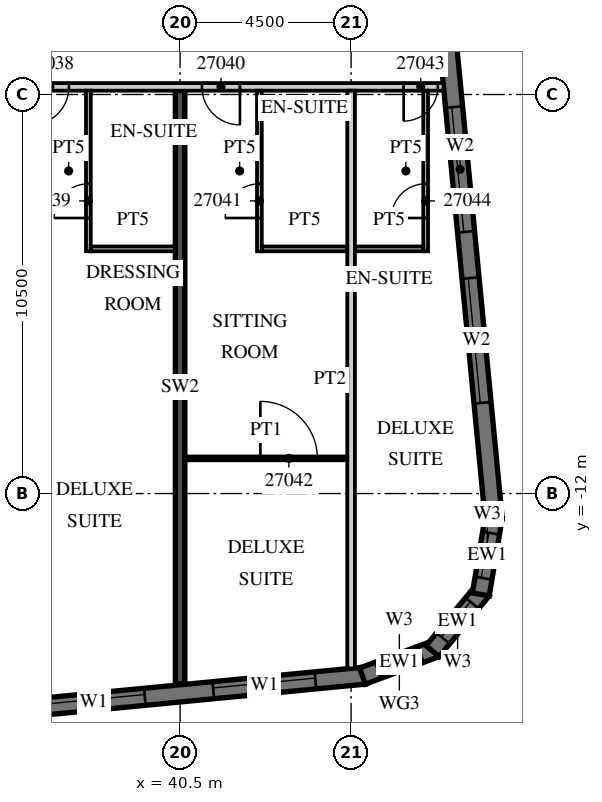
"""IFC4 building model, lengths in metres.
Left out: names, types, materials, properties, quantities, classifications, styles, units other than length and angle.
Written with IfcOpenShell. Run it as: python <this file> out.ifc"""

import sys

from ifc_helpers import new_model, si_unit, direction, frame, frame_2d, origin, place, context, subcontext, project, spatial, polyline, rectangle, outline, extrude, element, fill, save


model = new_model("IFC4")
c1 = context("Model", 3, precision=1e-05, world=origin(), true_north=direction((0.0, 1.0)))
c2 = subcontext(c1, "Body", "Model", "MODEL_VIEW")
j1 = project(units=[si_unit("LENGTHUNIT", "METRE"), si_unit("PLANEANGLEUNIT", "RADIAN")], contexts=[c1])
p1 = place(None, origin())
s1 = spatial("IfcSite", under=j1, at=p1, CompositionType="ELEMENT")
p2 = place(p1, origin())
s2 = spatial("IfcBuilding", under=s1, at=p2, CompositionType="ELEMENT")
p3 = place(p2, frame((0.0, 0.0, 124.0)))
s3 = spatial("IfcBuildingStorey", under=s2, at=p3, CompositionType="ELEMENT", Elevation=124.0)
p4 = place(p3, frame((40.5, -17.011, 0.0), z_axis=(0.0, 0.0, 1.0), x_axis=(0.0, 1.0, 0.0)))
e1 = element("IfcWall", 1, at=p4, inside=s3, PredefinedType="SHEAR", context=c2, shape_type="SweptSolid", body=[
    extrude(rectangle(XDim=15.611, YDim=0.25, at=frame_2d((7.805, 0.0))), origin(), (0.0, 0.0, 1.0), 3.3),
])
p5 = place(p3, frame((-13.521, -22.46, 0.0), z_axis=(0.0, 0.0, 1.0), x_axis=(0.995396096335, 0.095846812164, 0.0)))
e2 = element("IfcWall", 2, at=p5, inside=s3, PredefinedType="SOLIDWALL", context=c2, shape_type="SweptSolid", body=[
    extrude(rectangle(XDim=59.151, YDim=0.45, at=frame_2d((29.575, 0.0))), origin(), (0.0, 0.0, 1.0), 3.02),
])
p6 = place(p5, frame((0.91, 0.0, 0.45)))
e3 = element("IfcOpeningElement", 3, at=p6, cuts=e2, PredefinedType="OPENING", context=c2, shape_type="SweptSolid", body=[
    extrude(rectangle(XDim=2.7, YDim=2.25, at=frame_2d((1.35, 1.125))), frame((0.0, 0.235, 0.0), z_axis=(0.0, -1.0, 0.0), x_axis=(1.0, 0.0, 0.0)), (0.0, 0.0, 1.0), 0.47),
])
p7 = place(p5, frame((5.431, 0.0, 0.45)))
e4 = element("IfcOpeningElement", 4, at=p7, cuts=e2, PredefinedType="OPENING", context=c2, shape_type="SweptSolid", body=[
    extrude(rectangle(XDim=2.7, YDim=2.25, at=frame_2d((1.35, 1.125))), frame((0.0, 0.235, 0.0), z_axis=(0.0, -1.0, 0.0), x_axis=(1.0, 0.0, 0.0)), (0.0, 0.0, 1.0), 0.47),
])
p8 = place(p5, frame((9.952, 0.0, 0.45)))
e5 = element("IfcOpeningElement", 5, at=p8, cuts=e2, PredefinedType="OPENING", context=c2, shape_type="SweptSolid", body=[
    extrude(rectangle(XDim=2.7, YDim=2.25, at=frame_2d((1.35, 1.125))), frame((0.0, 0.235, 0.0), z_axis=(0.0, -1.0, 0.0), x_axis=(1.0, 0.0, 0.0)), (0.0, 0.0, 1.0), 0.47),
])
p9 = place(p5, frame((14.473, 0.0, 0.45)))
e6 = element("IfcOpeningElement", 6, at=p9, cuts=e2, PredefinedType="OPENING", context=c2, shape_type="SweptSolid", body=[
    extrude(rectangle(XDim=2.7, YDim=2.25, at=frame_2d((1.35, 1.125))), frame((0.0, 0.235, 0.0), z_axis=(0.0, -1.0, 0.0), x_axis=(1.0, 0.0, 0.0)), (0.0, 0.0, 1.0), 0.47),
])
p10 = place(p5, frame((18.994, 0.0, 0.45)))
e7 = element("IfcOpeningElement", 7, at=p10, cuts=e2, PredefinedType="OPENING", context=c2, shape_type="SweptSolid", body=[
    extrude(rectangle(XDim=2.7, YDim=2.25, at=frame_2d((1.35, 1.125))), frame((0.0, 0.235, 0.0), z_axis=(0.0, -1.0, 0.0), x_axis=(1.0, 0.0, 0.0)), (0.0, 0.0, 1.0), 0.47),
])
p11 = place(p5, frame((23.514, 0.0, 0.45)))
e8 = element("IfcOpeningElement", 8, at=p11, cuts=e2, PredefinedType="OPENING", context=c2, shape_type="SweptSolid", body=[
    extrude(rectangle(XDim=2.7, YDim=2.25, at=frame_2d((1.35, 1.125))), frame((0.0, 0.235, 0.0), z_axis=(0.0, -1.0, 0.0), x_axis=(1.0, 0.0, 0.0)), (0.0, 0.0, 1.0), 0.47),
])
p12 = place(p5, frame((28.035, 0.0, 0.45)))
e9 = element("IfcOpeningElement", 9, at=p12, cuts=e2, PredefinedType="OPENING", context=c2, shape_type="SweptSolid", body=[
    extrude(rectangle(XDim=2.7, YDim=2.25, at=frame_2d((1.35, 1.125))), frame((0.0, 0.235, 0.0), z_axis=(0.0, -1.0, 0.0), x_axis=(1.0, 0.0, 0.0)), (0.0, 0.0, 1.0), 0.47),
])
p13 = place(p5, frame((32.556, 0.0, 0.45)))
e10 = element("IfcOpeningElement", 10, at=p13, cuts=e2, PredefinedType="OPENING", context=c2, shape_type="SweptSolid", body=[
    extrude(rectangle(XDim=2.7, YDim=2.25, at=frame_2d((1.35, 1.125))), frame((0.0, 0.235, 0.0), z_axis=(0.0, -1.0, 0.0), x_axis=(1.0, 0.0, 0.0)), (0.0, 0.0, 1.0), 0.47),
])
p14 = place(p5, frame((37.077, 0.0, 0.45)))
e11 = element("IfcOpeningElement", 11, at=p14, cuts=e2, PredefinedType="OPENING", context=c2, shape_type="SweptSolid", body=[
    extrude(rectangle(XDim=2.7, YDim=2.25, at=frame_2d((1.35, 1.125))), frame((0.0, 0.235, 0.0), z_axis=(0.0, -1.0, 0.0), x_axis=(1.0, 0.0, 0.0)), (0.0, 0.0, 1.0), 0.47),
])
p15 = place(p5, frame((41.598, 0.0, 0.45)))
e12 = element("IfcOpeningElement", 12, at=p15, cuts=e2, PredefinedType="OPENING", context=c2, shape_type="SweptSolid", body=[
    extrude(rectangle(XDim=2.7, YDim=2.25, at=frame_2d((1.35, 1.125))), frame((0.0, 0.235, 0.0), z_axis=(0.0, -1.0, 0.0), x_axis=(1.0, 0.0, 0.0)), (0.0, 0.0, 1.0), 0.47),
])
p16 = place(p5, frame((46.118, 0.0, 0.45)))
e13 = element("IfcOpeningElement", 13, at=p16, cuts=e2, PredefinedType="OPENING", context=c2, shape_type="SweptSolid", body=[
    extrude(rectangle(XDim=2.7, YDim=2.25, at=frame_2d((1.35, 1.125))), frame((0.0, 0.235, 0.0), z_axis=(0.0, -1.0, 0.0), x_axis=(1.0, 0.0, 0.0)), (0.0, 0.0, 1.0), 0.47),
])
p17 = place(p5, frame((50.639, 0.0, 0.45)))
e14 = element("IfcOpeningElement", 14, at=p17, cuts=e2, PredefinedType="OPENING", context=c2, shape_type="SweptSolid", body=[
    extrude(rectangle(XDim=2.7, YDim=2.25, at=frame_2d((1.35, 1.125))), frame((0.0, 0.235, 0.0), z_axis=(0.0, -1.0, 0.0), x_axis=(1.0, 0.0, 0.0)), (0.0, 0.0, 1.0), 0.47),
])
p18 = place(p5, frame((55.15, 0.0, 0.45)))
e15 = element("IfcOpeningElement", 15, at=p18, cuts=e2, PredefinedType="OPENING", context=c2, shape_type="SweptSolid", body=[
    extrude(rectangle(XDim=2.7, YDim=2.25, at=frame_2d((1.35, 1.125))), frame((0.0, 0.235, 0.0), z_axis=(0.0, -1.0, 0.0), x_axis=(1.0, 0.0, 0.0)), (0.0, 0.0, 1.0), 0.47),
])
p19 = place(p3, frame((45.3, -16.804, 0.0), z_axis=(0.0, 0.0, 1.0), x_axis=(0.936677599948, 0.350192909346, 0.0)))
e16 = element("IfcWall", 16, at=p19, inside=s3, PredefinedType="SOLIDWALL", context=c2, shape_type="SweptSolid", body=[
    extrude(outline(polyline([(0.0, -0.225), (2.071, -0.225), (1.95, 0.225), (0.121, 0.225), (0.0, -0.225)])), origin(), (0.0, 0.0, 1.0), 3.02),
])
p20 = place(p19, frame((0.435, 0.0, 0.45)))
e17 = element("IfcOpeningElement", 17, at=p20, cuts=e16, PredefinedType="OPENING", context=c2, shape_type="SweptSolid", body=[
    extrude(rectangle(XDim=1.2, YDim=2.25, at=frame_2d((0.6, 1.125))), frame((0.0, 0.235, 0.0), z_axis=(0.0, -1.0, 0.0), x_axis=(1.0, 0.0, 0.0)), (0.0, 0.0, 1.0), 0.47),
])
p21 = place(p3, frame((47.145, -16.147, 0.0), z_axis=(0.0, 0.0, 1.0), x_axis=(0.635988241739, 0.771698747161, 0.0)))
e18 = element("IfcWall", 18, at=p21, inside=s3, PredefinedType="SOLIDWALL", context=c2, shape_type="SweptSolid", body=[
    extrude(outline(polyline([(0.0, -0.225), (2.071, -0.225), (1.95, 0.225), (0.121, 0.225), (0.0, -0.225)])), origin(), (0.0, 0.0, 1.0), 3.02),
])
p22 = place(p21, frame((0.435, 0.0, 0.45)))
e19 = element("IfcOpeningElement", 19, at=p22, cuts=e18, PredefinedType="OPENING", context=c2, shape_type="SweptSolid", body=[
    extrude(rectangle(XDim=1.2, YDim=2.25, at=frame_2d((0.6, 1.125))), frame((0.0, 0.235, 0.0), z_axis=(0.0, -1.0, 0.0), x_axis=(1.0, 0.0, 0.0)), (0.0, 0.0, 1.0), 0.47),
])
p23 = place(p3, frame((48.413, -14.655, 0.0), z_axis=(0.0, 0.0, 1.0), x_axis=(0.165068144653, 0.986282164302, 0.0)))
e20 = element("IfcWall", 20, at=p23, inside=s3, PredefinedType="SOLIDWALL", context=c2, shape_type="SweptSolid", body=[
    extrude(outline(polyline([(0.0, -0.225), (2.071, -0.225), (1.95, 0.225), (0.121, 0.225), (0.0, -0.225)])), origin(), (0.0, 0.0, 1.0), 3.02),
])
p24 = place(p23, frame((0.435, 0.0, 0.45)))
e21 = element("IfcOpeningElement", 21, at=p24, cuts=e20, PredefinedType="OPENING", context=c2, shape_type="SweptSolid", body=[
    extrude(rectangle(XDim=1.2, YDim=2.25, at=frame_2d((0.6, 1.125))), frame((0.0, 0.235, 0.0), z_axis=(0.0, -1.0, 0.0), x_axis=(1.0, 0.0, 0.0)), (0.0, 0.0, 1.0), 0.47),
])
p25 = place(p3, frame((48.753, -12.672, 0.0), z_axis=(0.0, 0.0, 1.0), x_axis=(-0.095842661909, 0.995396495954, 0.0)))
e22 = element("IfcWall", 22, at=p25, inside=s3, PredefinedType="SOLIDWALL", context=c2, shape_type="SweptSolid", body=[
    extrude(rectangle(XDim=35.0, YDim=0.45, at=frame_2d((17.5, 0.0))), origin(), (0.0, 0.0, 1.0), 3.02),
])
p26 = place(p25, frame((3.072, 0.0, 0.45)))
e23 = element("IfcOpeningElement", 23, at=p26, cuts=e22, PredefinedType="OPENING", context=c2, shape_type="SweptSolid", body=[
    extrude(rectangle(XDim=3.3, YDim=2.25, at=frame_2d((1.65, 1.125))), frame((0.0, 0.235, 0.0), z_axis=(0.0, -1.0, 0.0), x_axis=(1.0, 0.0, 0.0)), (0.0, 0.0, 1.0), 0.47),
])
p27 = place(p25, frame((7.593, 0.0, 0.45)))
e24 = element("IfcOpeningElement", 24, at=p27, cuts=e22, PredefinedType="OPENING", context=c2, shape_type="SweptSolid", body=[
    extrude(rectangle(XDim=3.3, YDim=2.25, at=frame_2d((1.65, 1.125))), frame((0.0, 0.235, 0.0), z_axis=(0.0, -1.0, 0.0), x_axis=(1.0, 0.0, 0.0)), (0.0, 0.0, 1.0), 0.47),
])
p28 = place(p3, frame((-13.5, -1.3, 0.0), z_axis=(0.0, 0.0, 1.0), x_axis=(1.0, 0.0, 0.0)))
e25 = element("IfcWall", 25, at=p28, inside=s3, PredefinedType="PARTITIONING", context=c2, shape_type="SweptSolid", body=[
    extrude(rectangle(XDim=60.932, YDim=0.2, at=frame_2d((30.466, 0.0))), origin(), (0.0, 0.0, 1.0), 3.02),
])
p29 = place(p28, frame((2.925, 0.0, 0.0)))
e26 = element("IfcOpeningElement", 26, at=p29, cuts=e25, PredefinedType="OPENING", context=c2, shape_type="SweptSolid", body=[
    extrude(rectangle(XDim=1.0, YDim=2.1, at=frame_2d((0.5, 1.05))), frame((0.0, 0.11, 0.0), z_axis=(0.0, -1.0, 0.0), x_axis=(1.0, 0.0, 0.0)), (0.0, 0.0, 1.0), 0.22),
])
p30 = place(p28, frame((9.863, 0.0, 0.0)))
e27 = element("IfcOpeningElement", 27, at=p30, cuts=e25, PredefinedType="OPENING", context=c2, shape_type="SweptSolid", body=[
    extrude(rectangle(XDim=1.2, YDim=2.1, at=frame_2d((0.6, 1.05))), frame((0.0, 0.11, 0.0), z_axis=(0.0, -1.0, 0.0), x_axis=(1.0, 0.0, 0.0)), (0.0, 0.0, 1.0), 0.22),
])
p31 = place(p28, frame((15.938, 0.0, 0.0)))
e28 = element("IfcOpeningElement", 28, at=p31, cuts=e25, PredefinedType="OPENING", context=c2, shape_type="SweptSolid", body=[
    extrude(rectangle(XDim=1.2, YDim=2.1, at=frame_2d((0.6, 1.05))), frame((0.0, 0.11, 0.0), z_axis=(0.0, -1.0, 0.0), x_axis=(1.0, 0.0, 0.0)), (0.0, 0.0, 1.0), 0.22),
])
p32 = place(p28, frame((27.862, 0.0, 0.0)))
e29 = element("IfcOpeningElement", 29, at=p32, cuts=e25, PredefinedType="OPENING", context=c2, shape_type="SweptSolid", body=[
    extrude(rectangle(XDim=1.2, YDim=2.1, at=frame_2d((0.6, 1.05))), frame((0.0, 0.11, 0.0), z_axis=(0.0, -1.0, 0.0), x_axis=(1.0, 0.0, 0.0)), (0.0, 0.0, 1.0), 0.22),
])
p33 = place(p28, frame((34.45, 0.0, 0.0)))
e30 = element("IfcOpeningElement", 30, at=p33, cuts=e25, PredefinedType="OPENING", context=c2, shape_type="SweptSolid", body=[
    extrude(rectangle(XDim=1.0, YDim=2.1, at=frame_2d((0.5, 1.05))), frame((0.0, 0.11, 0.0), z_axis=(0.0, -1.0, 0.0), x_axis=(1.0, 0.0, 0.0)), (0.0, 0.0, 1.0), 0.22),
])
p34 = place(p28, frame((36.55, 0.0, 0.0)))
e31 = element("IfcOpeningElement", 31, at=p34, cuts=e25, PredefinedType="OPENING", context=c2, shape_type="SweptSolid", body=[
    extrude(rectangle(XDim=1.0, YDim=2.1, at=frame_2d((0.5, 1.05))), frame((0.0, 0.11, 0.0), z_axis=(0.0, -1.0, 0.0), x_axis=(1.0, 0.0, 0.0)), (0.0, 0.0, 1.0), 0.22),
])
p35 = place(p28, frame((41.075, 0.0, 0.0)))
e32 = element("IfcOpeningElement", 32, at=p35, cuts=e25, PredefinedType="OPENING", context=c2, shape_type="SweptSolid", body=[
    extrude(rectangle(XDim=1.0, YDim=2.1, at=frame_2d((0.5, 1.05))), frame((0.0, 0.11, 0.0), z_axis=(0.0, -1.0, 0.0), x_axis=(1.0, 0.0, 0.0)), (0.0, 0.0, 1.0), 0.22),
])
p36 = place(p28, frame((45.55, 0.0, 0.0)))
e33 = element("IfcOpeningElement", 33, at=p36, cuts=e25, PredefinedType="OPENING", context=c2, shape_type="SweptSolid", body=[
    extrude(rectangle(XDim=1.0, YDim=2.1, at=frame_2d((0.5, 1.05))), frame((0.0, 0.11, 0.0), z_axis=(0.0, -1.0, 0.0), x_axis=(1.0, 0.0, 0.0)), (0.0, 0.0, 1.0), 0.22),
])
p37 = place(p28, frame((50.075, 0.0, 0.0)))
e34 = element("IfcOpeningElement", 34, at=p37, cuts=e25, PredefinedType="OPENING", context=c2, shape_type="SweptSolid", body=[
    extrude(rectangle(XDim=1.0, YDim=2.1, at=frame_2d((0.5, 1.05))), frame((0.0, 0.11, 0.0), z_axis=(0.0, -1.0, 0.0), x_axis=(1.0, 0.0, 0.0)), (0.0, 0.0, 1.0), 0.22),
])
p38 = place(p28, frame((54.575, 0.0, 0.0)))
e35 = element("IfcOpeningElement", 35, at=p38, cuts=e25, PredefinedType="OPENING", context=c2, shape_type="SweptSolid", body=[
    extrude(rectangle(XDim=1.0, YDim=2.1, at=frame_2d((0.5, 1.05))), frame((0.0, 0.11, 0.0), z_axis=(0.0, -1.0, 0.0), x_axis=(1.0, 0.0, 0.0)), (0.0, 0.0, 1.0), 0.22),
])
p39 = place(p28, frame((59.882, 0.0, 0.0)))
e36 = element("IfcOpeningElement", 36, at=p39, cuts=e25, PredefinedType="OPENING", context=c2, shape_type="SweptSolid", body=[
    extrude(rectangle(XDim=0.9, YDim=2.1, at=frame_2d((0.45, 1.05))), frame((0.0, 0.11, 0.0), z_axis=(0.0, -1.0, 0.0), x_axis=(1.0, 0.0, 0.0)), (0.0, 0.0, 1.0), 0.22),
])
p40 = place(p3, frame((38.087, -5.625, 0.0), z_axis=(0.0, 0.0, 1.0), x_axis=(0.0, 1.0, 0.0)))
e37 = element("IfcWall", 37, at=p40, inside=s3, PredefinedType="PARTITIONING", context=c2, shape_type="SweptSolid", body=[
    extrude(rectangle(XDim=4.225, YDim=0.125, at=frame_2d((2.113, 0.0))), origin(), (0.0, 0.0, 1.0), 3.02),
])
p41 = place(p40, frame((0.875, 0.0, 0.0)))
e38 = element("IfcOpeningElement", 38, at=p41, cuts=e37, PredefinedType="OPENING", context=c2, shape_type="SweptSolid", body=[
    extrude(rectangle(XDim=0.9, YDim=2.1, at=frame_2d((0.45, 1.05))), frame((0.0, 0.073, 0.0), z_axis=(0.0, -1.0, 0.0), x_axis=(1.0, 0.0, 0.0)), (0.0, 0.0, 1.0), 0.145),
])
p42 = place(p3, frame((38.15, -5.562, 0.0), z_axis=(0.0, 0.0, 1.0), x_axis=(1.0, 0.0, 0.0)))
e39 = element("IfcWall", 39, at=p42, inside=s3, PredefinedType="PARTITIONING", context=c2, shape_type="SweptSolid", body=[
    extrude(rectangle(XDim=2.225, YDim=0.125, at=frame_2d((1.113, 0.0))), origin(), (0.0, 0.0, 1.0), 3.02),
])
p43 = place(p3, frame((45.0, -16.599, 0.0), z_axis=(0.0, 0.0, 1.0), x_axis=(0.0, 1.0, 0.0)))
e40 = element("IfcWall", 40, at=p43, inside=s3, PredefinedType="PARTITIONING", context=c2, shape_type="SweptSolid", body=[
    extrude(rectangle(XDim=15.199, YDim=0.2, at=frame_2d((7.6, 0.0))), origin(), (0.0, 0.0, 1.0), 3.02),
])
p44 = place(p3, frame((42.587, -5.625, 0.0), z_axis=(0.0, 0.0, 1.0), x_axis=(0.0, 1.0, 0.0)))
e41 = element("IfcWall", 41, at=p44, inside=s3, PredefinedType="PARTITIONING", context=c2, shape_type="SweptSolid", body=[
    extrude(rectangle(XDim=4.225, YDim=0.125, at=frame_2d((2.113, 0.0))), origin(), (0.0, 0.0, 1.0), 3.02),
])
p45 = place(p44, frame((0.875, 0.0, 0.0)))
e42 = element("IfcOpeningElement", 42, at=p45, cuts=e41, PredefinedType="OPENING", context=c2, shape_type="SweptSolid", body=[
    extrude(rectangle(XDim=0.9, YDim=2.1, at=frame_2d((0.45, 1.05))), frame((0.0, 0.073, 0.0), z_axis=(0.0, -1.0, 0.0), x_axis=(1.0, 0.0, 0.0)), (0.0, 0.0, 1.0), 0.145),
])
p46 = place(p3, frame((42.65, -5.562, 0.0), z_axis=(0.0, 0.0, 1.0), x_axis=(1.0, 0.0, 0.0)))
e43 = element("IfcWall", 43, at=p46, inside=s3, PredefinedType="PARTITIONING", context=c2, shape_type="SweptSolid", body=[
    extrude(rectangle(XDim=2.25, YDim=0.125, at=frame_2d((1.125, 0.0))), origin(), (0.0, 0.0, 1.0), 3.02),
])
p47 = place(p3, frame((40.625, -11.075, 0.0), z_axis=(0.0, 0.0, 1.0), x_axis=(1.0, 0.0, 0.0)))
e44 = element("IfcWall", 44, at=p47, inside=s3, PredefinedType="PARTITIONING", context=c2, shape_type="SweptSolid", body=[
    extrude(rectangle(XDim=4.275, YDim=0.1, at=frame_2d((2.137, 0.0))), origin(), (0.0, 0.0, 1.0), 3.02),
])
p48 = place(p47, frame((1.988, 0.0, 0.0)))
e45 = element("IfcOpeningElement", 45, at=p48, cuts=e44, PredefinedType="OPENING", context=c2, shape_type="SweptSolid", body=[
    extrude(rectangle(XDim=1.5, YDim=2.1, at=frame_2d((0.75, 1.05))), frame((0.0, 0.06, 0.0), z_axis=(0.0, -1.0, 0.0), x_axis=(1.0, 0.0, 0.0)), (0.0, 0.0, 1.0), 0.12),
])
p49 = place(p3, frame((46.962, -5.625, 0.0), z_axis=(0.0, 0.0, 1.0), x_axis=(0.0, 1.0, 0.0)))
e46 = element("IfcWall", 46, at=p49, inside=s3, PredefinedType="PARTITIONING", context=c2, shape_type="SweptSolid", body=[
    extrude(rectangle(XDim=4.225, YDim=0.125, at=frame_2d((2.113, 0.0))), origin(), (0.0, 0.0, 1.0), 3.02),
])
p50 = place(p49, frame((0.875, 0.0, 0.0)))
e47 = element("IfcOpeningElement", 47, at=p50, cuts=e46, PredefinedType="OPENING", context=c2, shape_type="SweptSolid", body=[
    extrude(rectangle(XDim=0.9, YDim=2.1, at=frame_2d((0.45, 1.05))), frame((0.0, 0.073, 0.0), z_axis=(0.0, -1.0, 0.0), x_axis=(1.0, 0.0, 0.0)), (0.0, 0.0, 1.0), 0.145),
])
p51 = place(p3, frame((45.1, -5.562, 0.0), z_axis=(0.0, 0.0, 1.0), x_axis=(1.0, 0.0, 0.0)))
e48 = element("IfcWall", 48, at=p51, inside=s3, PredefinedType="PARTITIONING", context=c2, shape_type="SweptSolid", body=[
    extrude(rectangle(XDim=1.8, YDim=0.125, at=frame_2d((0.9, 0.0))), origin(), (0.0, 0.0, 1.0), 3.02),
])
p52 = place(p17, origin())
e49 = element("IfcWindow", 49, at=p52, inside=s3, PartitioningType="SINGLE_PANEL", PredefinedType="WINDOW", context=c2, shape_type="SweptSolid", body=[
    extrude(rectangle(XDim=2.7, YDim=2.25, at=frame_2d((1.35, 1.125))), frame((0.0, 0.09, 0.0), z_axis=(0.0, -1.0, 0.0), x_axis=(1.0, 0.0, 0.0)), (0.0, 0.0, 1.0), 0.06),
])
fill(e14, e49)
p53 = place(p18, origin())
e50 = element("IfcWindow", 50, at=p53, inside=s3, PartitioningType="SINGLE_PANEL", PredefinedType="WINDOW", context=c2, shape_type="SweptSolid", body=[
    extrude(rectangle(XDim=2.7, YDim=2.25, at=frame_2d((1.35, 1.125))), frame((0.0, 0.09, 0.0), z_axis=(0.0, -1.0, 0.0), x_axis=(1.0, 0.0, 0.0)), (0.0, 0.0, 1.0), 0.06),
])
fill(e15, e50)
p54 = place(p20, origin())
e51 = element("IfcWindow", 51, at=p54, inside=s3, PartitioningType="SINGLE_PANEL", PredefinedType="WINDOW", context=c2, shape_type="SweptSolid", body=[
    extrude(rectangle(XDim=1.2, YDim=2.25, at=frame_2d((0.6, 1.125))), frame((0.0, 0.09, 0.0), z_axis=(0.0, -1.0, 0.0), x_axis=(1.0, 0.0, 0.0)), (0.0, 0.0, 1.0), 0.06),
])
fill(e17, e51)
p55 = place(p22, origin())
e52 = element("IfcWindow", 52, at=p55, inside=s3, PartitioningType="SINGLE_PANEL", PredefinedType="WINDOW", context=c2, shape_type="SweptSolid", body=[
    extrude(rectangle(XDim=1.2, YDim=2.25, at=frame_2d((0.6, 1.125))), frame((0.0, 0.09, 0.0), z_axis=(0.0, -1.0, 0.0), x_axis=(1.0, 0.0, 0.0)), (0.0, 0.0, 1.0), 0.06),
])
fill(e19, e52)
p56 = place(p24, origin())
e53 = element("IfcWindow", 53, at=p56, inside=s3, PartitioningType="SINGLE_PANEL", PredefinedType="WINDOW", context=c2, shape_type="SweptSolid", body=[
    extrude(rectangle(XDim=1.2, YDim=2.25, at=frame_2d((0.6, 1.125))), frame((0.0, 0.09, 0.0), z_axis=(0.0, -1.0, 0.0), x_axis=(1.0, 0.0, 0.0)), (0.0, 0.0, 1.0), 0.06),
])
fill(e21, e53)
p57 = place(p26, origin())
e54 = element("IfcWindow", 54, at=p57, inside=s3, PartitioningType="SINGLE_PANEL", PredefinedType="WINDOW", context=c2, shape_type="SweptSolid", body=[
    extrude(rectangle(XDim=3.3, YDim=2.25, at=frame_2d((1.65, 1.125))), frame((0.0, 0.09, 0.0), z_axis=(0.0, -1.0, 0.0), x_axis=(1.0, 0.0, 0.0)), (0.0, 0.0, 1.0), 0.06),
])
fill(e23, e54)
p58 = place(p27, origin())
e55 = element("IfcWindow", 55, at=p58, inside=s3, PartitioningType="SINGLE_PANEL", PredefinedType="WINDOW", context=c2, shape_type="SweptSolid", body=[
    extrude(rectangle(XDim=3.3, YDim=2.25, at=frame_2d((1.65, 1.125))), frame((0.0, 0.09, 0.0), z_axis=(0.0, -1.0, 0.0), x_axis=(1.0, 0.0, 0.0)), (0.0, 0.0, 1.0), 0.06),
])
fill(e24, e55)
p59 = place(p37, origin())
e56 = element("IfcDoor", 56, at=p59, inside=s3, OperationType="SINGLE_SWING_LEFT", PredefinedType="DOOR", context=c2, shape_type="SweptSolid", body=[
    extrude(rectangle(XDim=1.0, YDim=2.1, at=frame_2d((0.5, 1.05))), frame((0.0, 0.025, 0.0), z_axis=(0.0, -1.0, 0.0), x_axis=(1.0, 0.0, 0.0)), (0.0, 0.0, 1.0), 0.05),
])
fill(e34, e56)
p60 = place(p41, origin())
e57 = element("IfcDoor", 57, at=p60, inside=s3, OperationType="SINGLE_SWING_LEFT", PredefinedType="DOOR", context=c2, shape_type="SweptSolid", body=[
    extrude(rectangle(XDim=0.9, YDim=2.1, at=frame_2d((0.45, 1.05))), frame((0.0, 0.025, 0.0), z_axis=(0.0, -1.0, 0.0), x_axis=(1.0, 0.0, 0.0)), (0.0, 0.0, 1.0), 0.05),
])
fill(e38, e57)
p61 = place(p38, origin())
e58 = element("IfcDoor", 58, at=p61, inside=s3, OperationType="SINGLE_SWING_RIGHT", PredefinedType="DOOR", context=c2, shape_type="SweptSolid", body=[
    extrude(rectangle(XDim=1.0, YDim=2.1, at=frame_2d((0.5, 1.05))), frame((0.0, 0.025, 0.0), z_axis=(0.0, -1.0, 0.0), x_axis=(1.0, 0.0, 0.0)), (0.0, 0.0, 1.0), 0.05),
])
fill(e35, e58)
p62 = place(p45, origin())
e59 = element("IfcDoor", 59, at=p62, inside=s3, OperationType="SINGLE_SWING_LEFT", PredefinedType="DOOR", context=c2, shape_type="SweptSolid", body=[
    extrude(rectangle(XDim=0.9, YDim=2.1, at=frame_2d((0.45, 1.05))), frame((0.0, 0.025, 0.0), z_axis=(0.0, -1.0, 0.0), x_axis=(1.0, 0.0, 0.0)), (0.0, 0.0, 1.0), 0.05),
])
fill(e42, e59)
p63 = place(p48, origin())
e60 = element("IfcDoor", 60, at=p63, inside=s3, OperationType="SINGLE_SWING_LEFT", PredefinedType="DOOR", context=c2, shape_type="SweptSolid", body=[
    extrude(rectangle(XDim=1.5, YDim=2.1, at=frame_2d((0.75, 1.05))), frame((0.0, 0.025, 0.0), z_axis=(0.0, -1.0, 0.0), x_axis=(1.0, 0.0, 0.0)), (0.0, 0.0, 1.0), 0.05),
])
fill(e45, e60)
p64 = place(p39, origin())
e61 = element("IfcDoor", 61, at=p64, inside=s3, OperationType="SINGLE_SWING_LEFT", PredefinedType="DOOR", context=c2, shape_type="SweptSolid", body=[
    extrude(rectangle(XDim=0.9, YDim=2.1, at=frame_2d((0.45, 1.05))), frame((0.0, 0.025, 0.0), z_axis=(0.0, -1.0, 0.0), x_axis=(1.0, 0.0, 0.0)), (0.0, 0.0, 1.0), 0.05),
])
fill(e36, e61)
p65 = place(p50, origin())
e62 = element("IfcDoor", 62, at=p65, inside=s3, OperationType="SINGLE_SWING_LEFT", PredefinedType="DOOR", context=c2, shape_type="SweptSolid", body=[
    extrude(rectangle(XDim=0.9, YDim=2.1, at=frame_2d((0.45, 1.05))), frame((0.0, 0.025, 0.0), z_axis=(0.0, -1.0, 0.0), x_axis=(1.0, 0.0, 0.0)), (0.0, 0.0, 1.0), 0.05),
])
fill(e47, e62)
save(model, sys.argv[1])
